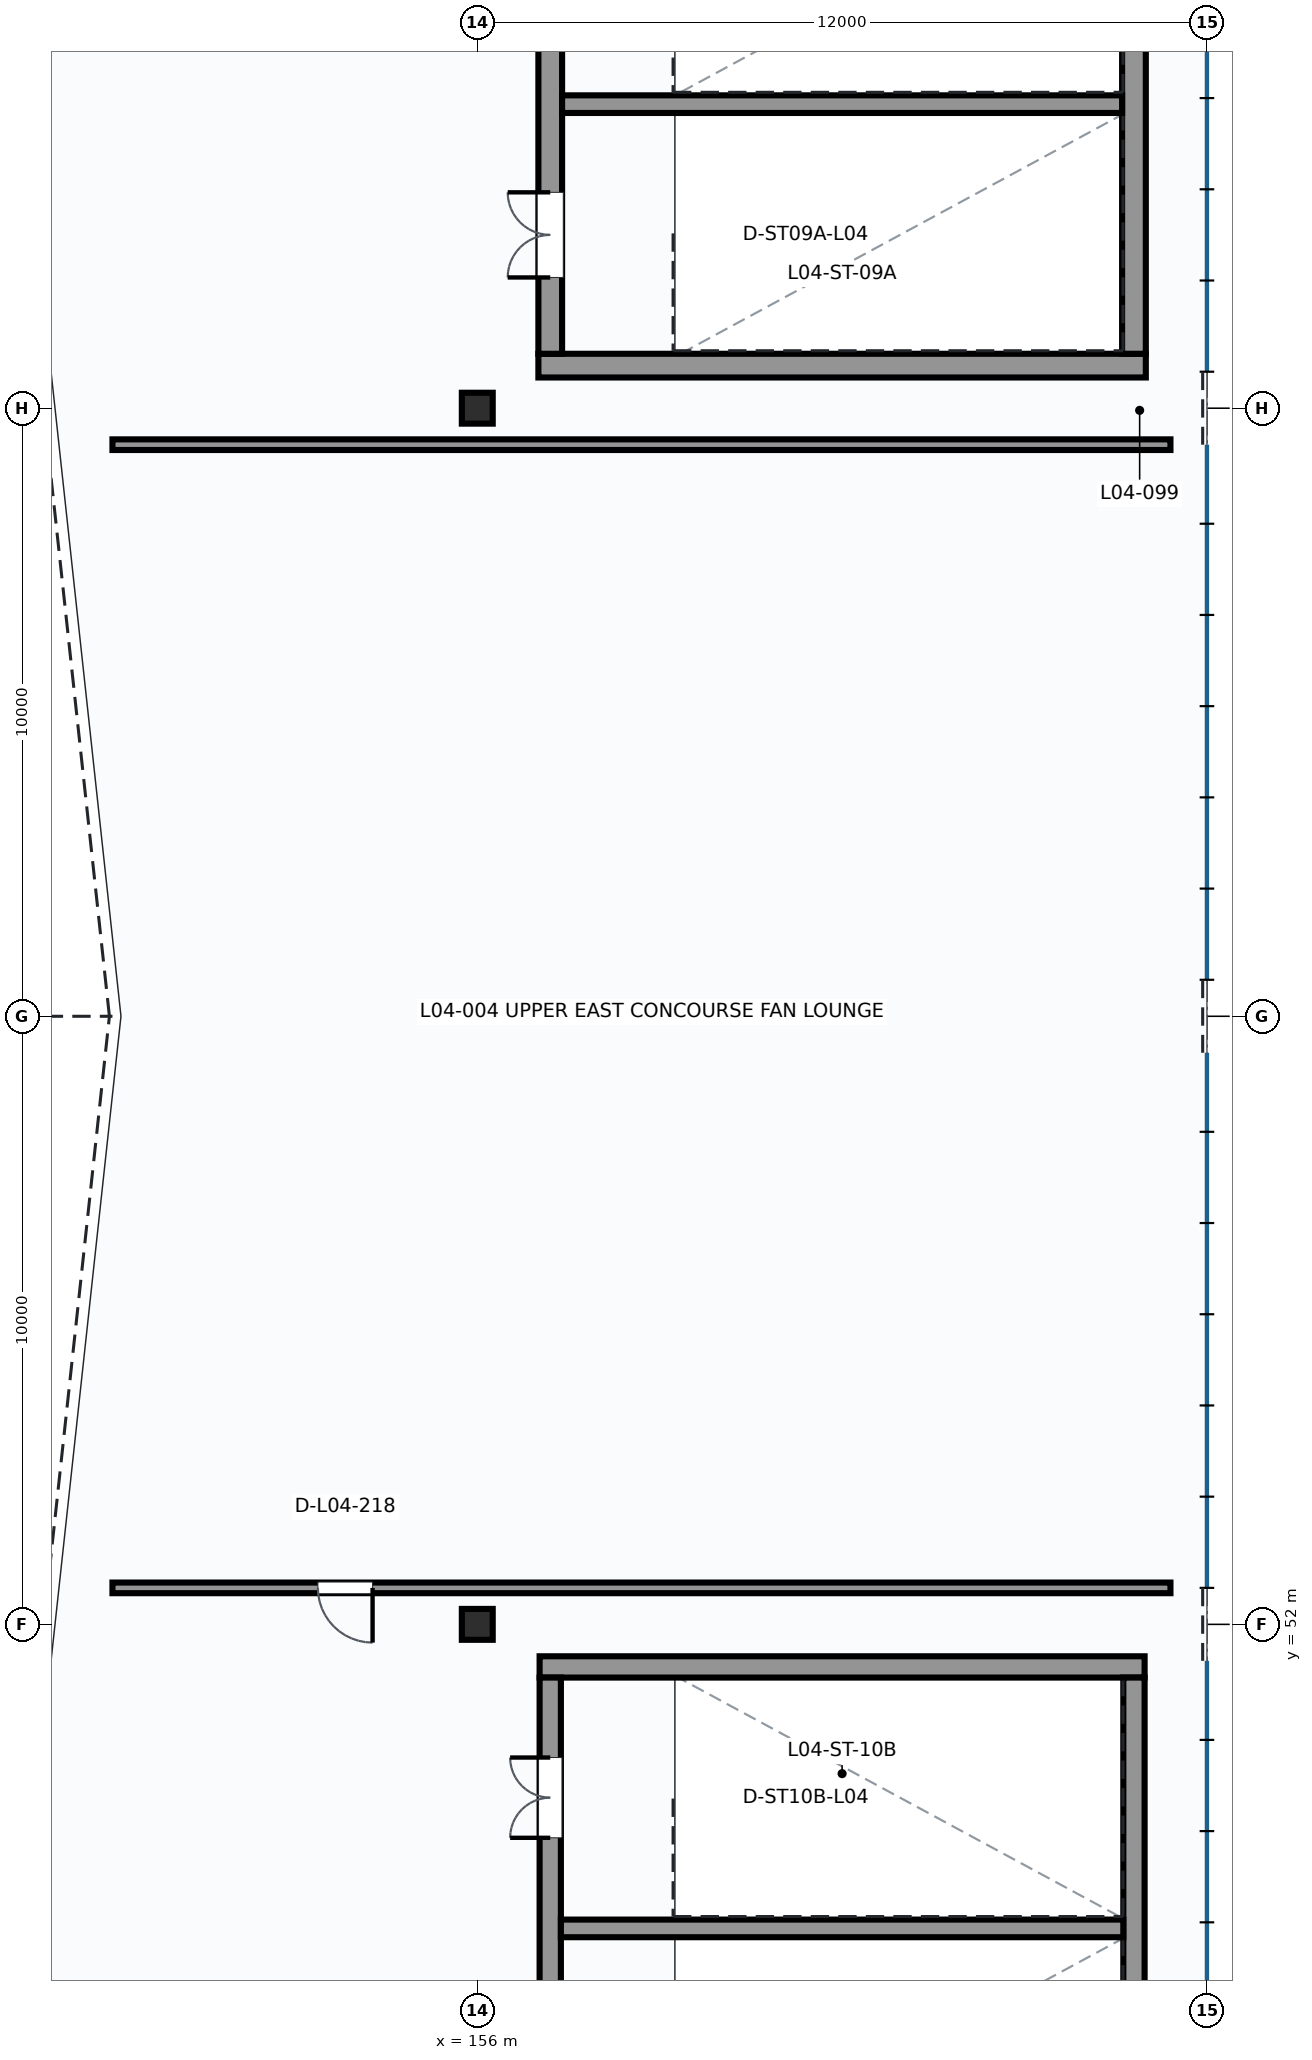
"""IFC4 building model, lengths in metres.
Left out: names, types, materials, properties, quantities, classifications, styles, units other than length and angle.
Written with IfcOpenShell. Run it as: python <this file> out.ifc"""

import sys

from ifc_helpers import new_model, si_unit, direction, frame, frame_2d, origin, origin_2d, place, context, subcontext, project, spatial, rectangle, hollow_circle, extrude, element, fill, save


model = new_model("IFC4")
c1 = context("Model", 3, precision=1e-05, world=origin(), true_north=direction((0.0, 1.0)))
c2 = subcontext(c1, "Body", "Model", "MODEL_VIEW")
j1 = project(units=[si_unit("LENGTHUNIT", "METRE"), si_unit("PLANEANGLEUNIT", "RADIAN")], contexts=[c1])
p1 = place(None, origin())
s1 = spatial("IfcSite", under=j1, at=p1, CompositionType="ELEMENT")
p2 = place(p1, origin())
s2 = spatial("IfcBuilding", under=s1, at=p2, CompositionType="ELEMENT")
p3 = place(p2, frame((0.0, 0.0, 19.2)))
s3 = spatial("IfcBuildingStorey", under=s2, at=p3, CompositionType="ELEMENT", Elevation=19.2)
for number, where, z_axis, x_axis in (
    (1, (156.0, 52.0, 0.0), (0.0, 0.0, 1.0), (1.0, 0.0, 0.0)),
    (2, (156.0, 72.0, 0.0), (0.0, 0.0, 1.0), (1.0, 0.0, 0.0)),
):
    element("IfcColumn", number, at=place(p3, frame(where, z_axis=z_axis, x_axis=x_axis)), inside=s3, PredefinedType="COLUMN", context=c2, shape_type="SweptSolid", body=[
        extrude(hollow_circle(Radius=0.254, WallThickness=0.02, at=origin_2d()), origin(), (0.0, 0.0, 1.0), 5.4),
    ])
p4 = place(p3, frame((157.005, 72.7, 0.0), z_axis=(0.0, 0.0, 1.0), x_axis=(1.0, 0.0, 0.0)))
e3 = element("IfcWall", 3, at=p4, inside=s3, PredefinedType="SHEAR", context=c2, shape_type="SweptSolid", body=[
    extrude(rectangle(XDim=9.99, YDim=0.39, at=frame_2d((4.995, 0.0))), origin(), (0.0, 0.0, 1.0), 5.4),
])
p5 = place(p3, frame((157.2, 72.895, 0.0), z_axis=(0.0, 0.0, 1.0), x_axis=(0.0, 1.0, 0.0)))
e4 = element("IfcWall", 4, at=p5, inside=s3, PredefinedType="SHEAR", context=c2, shape_type="SweptSolid", body=[
    extrude(rectangle(XDim=8.21, YDim=0.39, at=frame_2d((4.105, 0.0))), origin(), (0.0, 0.0, 1.0), 5.4),
])
p6 = place(p5, frame((1.255, 0.0, 0.0)))
e5 = element("IfcOpeningElement", 5, at=p6, cuts=e4, PredefinedType="OPENING", context=c2, shape_type="SweptSolid", body=[
    extrude(rectangle(XDim=1.4, YDim=2.2, at=frame_2d((0.7, 1.1))), frame((0.0, 0.205, 0.0), z_axis=(0.0, -1.0, 0.0), x_axis=(1.0, 0.0, 0.0)), (0.0, 0.0, 1.0), 0.41),
])
p7 = place(p5, frame((5.595, 0.0, 0.0)))
e6 = element("IfcOpeningElement", 6, at=p7, cuts=e4, PredefinedType="OPENING", context=c2, shape_type="SweptSolid", body=[
    extrude(rectangle(XDim=1.32, YDim=2.2, at=frame_2d((0.66, 1.1))), frame((0.0, 0.205, 0.0), z_axis=(0.0, -1.0, 0.0), x_axis=(1.0, 0.0, 0.0)), (0.0, 0.0, 1.0), 0.41),
])
p8 = place(p3, frame((166.8, 72.895, 0.0), z_axis=(0.0, 0.0, 1.0), x_axis=(0.0, 1.0, 0.0)))
e7 = element("IfcWall", 7, at=p8, inside=s3, PredefinedType="SHEAR", context=c2, shape_type="SweptSolid", body=[
    extrude(rectangle(XDim=8.21, YDim=0.39, at=frame_2d((4.105, 0.0))), origin(), (0.0, 0.0, 1.0), 5.4),
])
p9 = place(p3, frame((157.395, 77.0, 0.0), z_axis=(0.0, 0.0, 1.0), x_axis=(1.0, 0.0, 0.0)))
e8 = element("IfcWall", 8, at=p9, inside=s3, PredefinedType="SHEAR", context=c2, shape_type="SweptSolid", body=[
    extrude(rectangle(XDim=9.21, YDim=0.29, at=frame_2d((4.605, 0.0))), origin(), (0.0, 0.0, 1.0), 5.4),
])
p10 = place(p3, frame((157.025, 51.3, 0.0), z_axis=(0.0, 0.0, 1.0), x_axis=(1.0, 0.0, 0.0)))
e9 = element("IfcWall", 9, at=p10, inside=s3, PredefinedType="SHEAR", context=c2, shape_type="SweptSolid", body=[
    extrude(rectangle(XDim=9.95, YDim=0.35, at=frame_2d((4.975, 0.0))), origin(), (0.0, 0.0, 1.0), 5.4),
])
p11 = place(p3, frame((157.2, 42.875, 0.0), z_axis=(0.0, 0.0, 1.0), x_axis=(0.0, 1.0, 0.0)))
e10 = element("IfcWall", 10, at=p11, inside=s3, PredefinedType="SHEAR", context=c2, shape_type="SweptSolid", body=[
    extrude(rectangle(XDim=8.25, YDim=0.35, at=frame_2d((4.125, 0.0))), origin(), (0.0, 0.0, 1.0), 5.4),
])
p12 = place(p11, frame((1.275, 0.0, 0.0)))
e11 = element("IfcOpeningElement", 11, at=p12, cuts=e10, PredefinedType="OPENING", context=c2, shape_type="SweptSolid", body=[
    extrude(rectangle(XDim=1.4, YDim=2.2, at=frame_2d((0.7, 1.1))), frame((0.0, 0.185, 0.0), z_axis=(0.0, -1.0, 0.0), x_axis=(1.0, 0.0, 0.0)), (0.0, 0.0, 1.0), 0.37),
])
p13 = place(p11, frame((5.615, 0.0, 0.0)))
e12 = element("IfcOpeningElement", 12, at=p13, cuts=e10, PredefinedType="OPENING", context=c2, shape_type="SweptSolid", body=[
    extrude(rectangle(XDim=1.32, YDim=2.2, at=frame_2d((0.66, 1.1))), frame((0.0, 0.185, 0.0), z_axis=(0.0, -1.0, 0.0), x_axis=(1.0, 0.0, 0.0)), (0.0, 0.0, 1.0), 0.37),
])
p14 = place(p3, frame((166.8, 42.875, 0.0), z_axis=(0.0, 0.0, 1.0), x_axis=(0.0, 1.0, 0.0)))
e13 = element("IfcWall", 13, at=p14, inside=s3, PredefinedType="SHEAR", context=c2, shape_type="SweptSolid", body=[
    extrude(rectangle(XDim=8.25, YDim=0.35, at=frame_2d((4.125, 0.0))), origin(), (0.0, 0.0, 1.0), 5.4),
])
p15 = place(p3, frame((157.375, 47.0, 0.0), z_axis=(0.0, 0.0, 1.0), x_axis=(1.0, 0.0, 0.0)))
e14 = element("IfcWall", 14, at=p15, inside=s3, PredefinedType="SHEAR", context=c2, shape_type="SweptSolid", body=[
    extrude(rectangle(XDim=9.25, YDim=0.29, at=frame_2d((4.625, 0.0))), origin(), (0.0, 0.0, 1.0), 5.4),
])
p16 = place(p3, frame((167.4, 52.6, 0.0), z_axis=(0.0, 0.0, 1.0), x_axis=(-1.0, 0.0, 0.0)))
e15 = element("IfcWall", 15, at=p16, inside=s3, PredefinedType="PARTITIONING", context=c2, shape_type="SweptSolid", body=[
    extrude(rectangle(XDim=17.4, YDim=0.175, at=frame_2d((8.7, 0.0))), origin(), (0.0, 0.0, 1.0), 5.07),
])
p17 = place(p16, frame((13.122, 0.0, 0.0)))
e16 = element("IfcOpeningElement", 16, at=p17, cuts=e15, PredefinedType="OPENING", context=c2, shape_type="SweptSolid", body=[
    extrude(rectangle(XDim=0.9, YDim=2.1, at=frame_2d((0.45, 1.05))), frame((0.0, 0.097, 0.0), z_axis=(0.0, -1.0, 0.0), x_axis=(1.0, 0.0, 0.0)), (0.0, 0.0, 1.0), 0.195),
])
p18 = place(p3, frame((150.0, 71.4, 0.0), z_axis=(0.0, 0.0, 1.0), x_axis=(1.0, 0.0, 0.0)))
e17 = element("IfcWall", 17, at=p18, inside=s3, PredefinedType="PARTITIONING", context=c2, shape_type="SweptSolid", body=[
    extrude(rectangle(XDim=17.4, YDim=0.175, at=frame_2d((8.7, 0.0))), origin(), (0.0, 0.0, 1.0), 5.07),
])
p19 = place(p6, origin())
e18 = element("IfcDoor", 18, at=p19, inside=s3, OperationType="DOUBLE_DOOR_SINGLE_SWING", PredefinedType="DOOR", context=c2, shape_type="SweptSolid", body=[
    extrude(rectangle(XDim=1.4, YDim=2.2, at=frame_2d((0.7, 1.1))), frame((0.0, 0.025, 0.0), z_axis=(0.0, -1.0, 0.0), x_axis=(1.0, 0.0, 0.0)), (0.0, 0.0, 1.0), 0.05),
])
fill(e5, e18)
p20 = place(p13, origin())
e19 = element("IfcDoor", 19, at=p20, inside=s3, OperationType="DOUBLE_DOOR_SINGLE_SWING", PredefinedType="DOOR", context=c2, shape_type="SweptSolid", body=[
    extrude(rectangle(XDim=1.32, YDim=2.2, at=frame_2d((0.66, 1.1))), frame((0.0, 0.025, 0.0), z_axis=(0.0, -1.0, 0.0), x_axis=(1.0, 0.0, 0.0)), (0.0, 0.0, 1.0), 0.05),
])
fill(e12, e19)
p21 = place(p17, origin())
e20 = element("IfcDoor", 20, at=p21, inside=s3, OperationType="SINGLE_SWING_LEFT", PredefinedType="DOOR", context=c2, shape_type="SweptSolid", body=[
    extrude(rectangle(XDim=0.9, YDim=2.1, at=frame_2d((0.45, 1.05))), frame((0.0, 0.025, 0.0), z_axis=(0.0, -1.0, 0.0), x_axis=(1.0, 0.0, 0.0)), (0.0, 0.0, 1.0), 0.05),
])
fill(e16, e20)
save(model, sys.argv[1])
